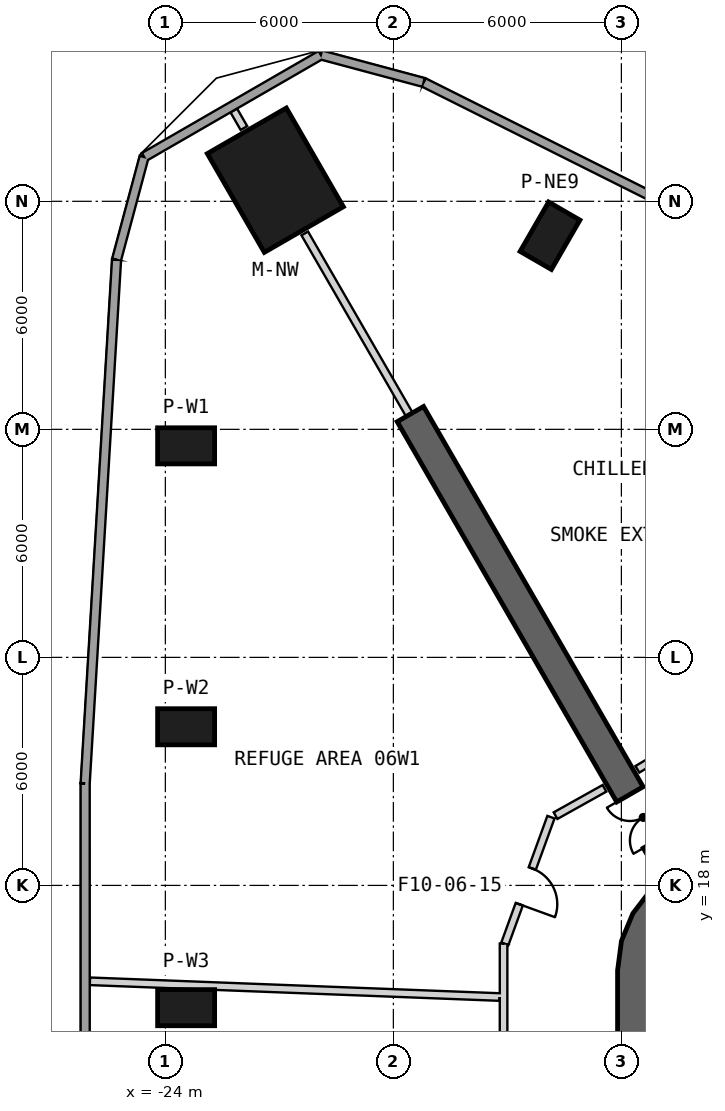
"""IFC4 building model, lengths in metres.
Left out: names, types, materials, properties, quantities, classifications, styles, units other than length and angle.
Written with IfcOpenShell. Run it as: python <this file> out.ifc"""

import sys

from ifc_helpers import new_model, si_unit, direction, frame, frame_2d, origin, origin_2d, place, context, subcontext, project, spatial, polyline, rectangle, outline, extrude, element, fill, save


model = new_model("IFC4")
c1 = context("Model", 3, precision=1e-05, world=origin(), true_north=direction((0.0, 1.0)))
c2 = subcontext(c1, "Body", "Model", "MODEL_VIEW")
j1 = project(units=[si_unit("LENGTHUNIT", "METRE"), si_unit("PLANEANGLEUNIT", "RADIAN")], contexts=[c1])
p1 = place(None, origin())
s1 = spatial("IfcSite", under=j1, at=p1, CompositionType="ELEMENT")
p2 = place(p1, origin())
s2 = spatial("IfcBuilding", under=s1, at=p2, CompositionType="ELEMENT")
p3 = place(p2, frame((0.0, 0.0, 39.5)))
s3 = spatial("IfcBuildingStorey", under=s2, at=p3, CompositionType="ELEMENT", Elevation=39.5)
p4 = place(p3, frame((-21.106, 36.556, 0.0), z_axis=(0.0, 0.0, 1.0), x_axis=(-0.5, 0.866025403784, 0.0)))
e1 = element("IfcColumn", 1, at=p4, inside=s3, PredefinedType="COLUMN", context=c2, shape_type="SweptSolid", body=[
    extrude(rectangle(XDim=3.0, YDim=2.4, at=origin_2d()), origin(), (0.0, 0.0, 1.0), 5.7),
])
for number, where, z_axis, x_axis in (
    (2, (-23.453, 29.566, 0.0), (0.0, 0.0, 1.0), (-1.0, 0.0, 0.0)),
    (3, (-23.453, 22.174, 0.0), (0.0, 0.0, 1.0), (-1.0, 0.0, 0.0)),
    (4, (-23.453, 14.783, 0.0), (0.0, 0.0, 1.0), (-1.0, 0.0, 0.0)),
    (5, (-13.878, 35.094, 0.0), (0.0, 0.0, 1.0), (0.5, 0.866, 0.0)),
):
    element("IfcColumn", number, at=place(p3, frame(where, z_axis=z_axis, x_axis=x_axis)), inside=s3, PredefinedType="COLUMN", context=c2, shape_type="SweptSolid", body=[
        extrude(rectangle(XDim=1.5, YDim=0.95, at=origin_2d()), origin(), (0.0, 0.0, 1.0), 5.7),
    ])
p5 = place(p3, frame((-11.65, 15.762, 0.0), z_axis=(0.0, 0.0, 1.0), x_axis=(0.0, -1.0, 0.0)))
e6 = element("IfcWall", 6, at=p5, inside=s3, PredefinedType="SHEAR", context=c2, shape_type="SweptSolid", body=[
    extrude(rectangle(XDim=31.523, YDim=0.9, at=frame_2d((15.762, 0.0))), origin(), (0.0, 0.0, 1.0), 6.0),
])
p6 = place(p5, frame((3.612, 0.0, 0.0)))
e7 = element("IfcOpeningElement", 7, at=p6, cuts=e6, PredefinedType="OPENING", context=c2, shape_type="SweptSolid", body=[
    extrude(rectangle(XDim=1.2, YDim=2.4, at=frame_2d((0.6, 1.2))), frame((0.0, 0.46, 0.0), z_axis=(0.0, -1.0, 0.0), x_axis=(1.0, 0.0, 0.0)), (0.0, 0.0, 1.0), 0.92),
])
p7 = place(p5, frame((26.712, 0.0, 0.0)))
e8 = element("IfcOpeningElement", 8, at=p7, cuts=e6, PredefinedType="OPENING", context=c2, shape_type="SweptSolid", body=[
    extrude(rectangle(XDim=1.2, YDim=2.4, at=frame_2d((0.6, 1.2))), frame((0.0, 0.46, 0.0), z_axis=(0.0, -1.0, 0.0), x_axis=(1.0, 0.0, 0.0)), (0.0, 0.0, 1.0), 0.92),
])
p8 = place(p3, origin())
e9 = element("IfcWall", 9, at=p8, inside=s3, PredefinedType="SHEAR", context=c2, shape_type="SweptSolid", body=[
    extrude(outline(polyline([(-7.6, 18.36), (-8.323, 18.659), (-9.1, 18.762), (-9.876, 18.659), (-10.6, 18.36), (-11.221, 17.883), (-11.698, 17.262), (-11.998, 16.538), (-12.1, 15.762), (-11.2, 15.762), (-11.128, 16.305), (-10.919, 16.812), (-10.585, 17.247), (-10.15, 17.58), (-9.644, 17.79), (-9.1, 17.862), (-8.556, 17.79), (-8.05, 17.58), (-7.6, 18.36)])), origin(), (0.0, 0.0, 1.0), 6.0),
])
p9 = place(p3, frame((-10.575, 18.316, 0.0), z_axis=(0.0, 0.0, 1.0), x_axis=(-0.499996575515, 0.866027380903, 0.0)))
e10 = element("IfcWall", 10, at=p9, inside=s3, PredefinedType="SHEAR", context=c2, shape_type="SweptSolid", body=[
    extrude(rectangle(XDim=13.954, YDim=0.8, at=frame_2d((6.977, 0.0))), origin(), (0.0, 0.0, 1.0), 6.0),
])
p10 = place(p9, frame((1.0, 0.0, 0.0)))
e11 = element("IfcOpeningElement", 11, at=p10, cuts=e10, PredefinedType="OPENING", context=c2, shape_type="SweptSolid", body=[
    extrude(rectangle(XDim=1.4, YDim=2.4, at=frame_2d((0.7, 1.2))), frame((0.0, 0.41, 0.0), z_axis=(0.0, -1.0, 0.0), x_axis=(1.0, 0.0, 0.0)), (0.0, 0.0, 1.0), 0.82),
])
p11 = place(p3, frame((-4.861, 32.952, 0.0), z_axis=(0.0, 0.0, 1.0), x_axis=(-0.894285628533, 0.447496608478, 0.0)))
e12 = element("IfcWall", 12, at=p11, inside=s3, PredefinedType="SOLIDWALL", context=c2, shape_type="SweptSolid", body=[
    extrude(rectangle(XDim=13.801, YDim=0.24, at=frame_2d((6.901, 0.0))), origin(), (0.0, 0.0, 1.0), 5.7),
])
p12 = place(p3, frame((-17.203, 39.128, 0.0), z_axis=(0.0, 0.0, 1.0), x_axis=(-0.965923146675, 0.25882904535, 0.0)))
e13 = element("IfcWall", 13, at=p12, inside=s3, PredefinedType="SOLIDWALL", context=c2, shape_type="SweptSolid", body=[
    extrude(rectangle(XDim=2.801, YDim=0.24, at=frame_2d((1.4, 0.0))), origin(), (0.0, 0.0, 1.0), 5.7),
])
p13 = place(p3, frame((-19.908, 39.853, 0.0), z_axis=(0.0, 0.0, 1.0), x_axis=(-0.866010734295, -0.500025407441, 0.0)))
e14 = element("IfcWall", 14, at=p13, inside=s3, PredefinedType="SOLIDWALL", context=c2, shape_type="SweptSolid", body=[
    extrude(rectangle(XDim=5.371, YDim=0.24, at=frame_2d((2.686, 0.0))), origin(), (0.0, 0.0, 1.0), 5.7),
])
p14 = place(p3, frame((-24.56, 37.167, 0.0), z_axis=(0.0, 0.0, 1.0), x_axis=(-0.258850842196, -0.965917305723, 0.0)))
e15 = element("IfcWall", 15, at=p14, inside=s3, PredefinedType="SOLIDWALL", context=c2, shape_type="SweptSolid", body=[
    extrude(rectangle(XDim=2.8, YDim=0.24, at=frame_2d((1.4, 0.0))), origin(), (0.0, 0.0, 1.0), 5.7),
])
p15 = place(p3, frame((-25.284, 34.462, 0.0), z_axis=(0.0, 0.0, 1.0), x_axis=(-0.059807686217, -0.998209918138, 0.0)))
e16 = element("IfcWall", 16, at=p15, inside=s3, PredefinedType="SOLIDWALL", context=c2, shape_type="SweptSolid", body=[
    extrude(rectangle(XDim=13.802, YDim=0.24, at=frame_2d((6.901, 0.0))), origin(), (0.0, 0.0, 1.0), 5.7),
])
p16 = place(p3, frame((-26.11, 20.685, 0.0), z_axis=(0.0, 0.0, 1.0), x_axis=(7.0815678e-05, -0.999999997493, 0.0)))
e17 = element("IfcWall", 17, at=p16, inside=s3, PredefinedType="SOLIDWALL", context=c2, shape_type="SweptSolid", body=[
    extrude(rectangle(XDim=41.371, YDim=0.24, at=frame_2d((20.685, 0.0))), origin(), (0.0, 0.0, 1.0), 5.7),
])
p17 = place(p3, frame((-15.1, 16.47, 0.0), z_axis=(0.0, 0.0, 1.0), x_axis=(0.0, -1.0, 0.0)))
e18 = element("IfcWall", 18, at=p17, inside=s3, PredefinedType="PARTITIONING", context=c2, shape_type="SweptSolid", body=[
    extrude(rectangle(XDim=32.94, YDim=0.2, at=frame_2d((16.47, 0.0))), origin(), (0.0, 0.0, 1.0), 4.88),
])
p18 = place(p17, frame((3.84, 0.0, 0.0)))
e19 = element("IfcOpeningElement", 19, at=p18, cuts=e18, PredefinedType="OPENING", context=c2, shape_type="SweptSolid", body=[
    extrude(rectangle(XDim=1.0, YDim=2.1, at=frame_2d((0.5, 1.05))), frame((0.0, 0.11, 0.0), z_axis=(0.0, -1.0, 0.0), x_axis=(1.0, 0.0, 0.0)), (0.0, 0.0, 1.0), 0.22),
])
p19 = place(p17, frame((9.805, 0.0, 0.0)))
e20 = element("IfcOpeningElement", 20, at=p19, cuts=e18, PredefinedType="OPENING", context=c2, shape_type="SweptSolid", body=[
    extrude(rectangle(XDim=1.0, YDim=2.1, at=frame_2d((0.5, 1.05))), frame((0.0, 0.11, 0.0), z_axis=(0.0, -1.0, 0.0), x_axis=(1.0, 0.0, 0.0)), (0.0, 0.0, 1.0), 0.22),
])
p20 = place(p17, frame((15.769, 0.0, 0.0)))
e21 = element("IfcOpeningElement", 21, at=p20, cuts=e18, PredefinedType="OPENING", context=c2, shape_type="SweptSolid", body=[
    extrude(rectangle(XDim=1.0, YDim=2.1, at=frame_2d((0.5, 1.05))), frame((0.0, 0.11, 0.0), z_axis=(0.0, -1.0, 0.0), x_axis=(1.0, 0.0, 0.0)), (0.0, 0.0, 1.0), 0.22),
])
p21 = place(p17, frame((21.734, 0.0, 0.0)))
e22 = element("IfcOpeningElement", 22, at=p21, cuts=e18, PredefinedType="OPENING", context=c2, shape_type="SweptSolid", body=[
    extrude(rectangle(XDim=1.0, YDim=2.1, at=frame_2d((0.5, 1.05))), frame((0.0, 0.11, 0.0), z_axis=(0.0, -1.0, 0.0), x_axis=(1.0, 0.0, 0.0)), (0.0, 0.0, 1.0), 0.22),
])
p22 = place(p17, frame((27.699, 0.0, 0.0)))
e23 = element("IfcOpeningElement", 23, at=p22, cuts=e18, PredefinedType="OPENING", context=c2, shape_type="SweptSolid", body=[
    extrude(rectangle(XDim=1.0, YDim=2.1, at=frame_2d((0.5, 1.05))), frame((0.0, 0.11, 0.0), z_axis=(0.0, -1.0, 0.0), x_axis=(1.0, 0.0, 0.0)), (0.0, 0.0, 1.0), 0.22),
])
p23 = place(p3, frame((-13.853, 19.796, 0.0), z_axis=(0.0, 0.0, 1.0), x_axis=(-0.342013954414, -0.939694873342, 0.0)))
e24 = element("IfcWall", 24, at=p23, inside=s3, PredefinedType="PARTITIONING", context=c2, shape_type="SweptSolid", body=[
    extrude(rectangle(XDim=3.546, YDim=0.2, at=frame_2d((1.773, 0.0))), origin(), (0.0, 0.0, 1.0), 4.78),
])
p24 = place(p23, frame((1.437, 0.0, 0.0)))
e25 = element("IfcOpeningElement", 25, at=p24, cuts=e24, PredefinedType="OPENING", context=c2, shape_type="SweptSolid", body=[
    extrude(rectangle(XDim=1.0, YDim=2.1, at=frame_2d((0.5, 1.05))), frame((0.0, 0.11, 0.0), z_axis=(0.0, -1.0, 0.0), x_axis=(1.0, 0.0, 0.0)), (0.0, 0.0, 1.0), 0.22),
])
p25 = place(p3, frame((-12.445, 20.555, 0.0), z_axis=(0.0, 0.0, 1.0), x_axis=(-0.873030545865, -0.487665526757, 0.0)))
e26 = element("IfcWall", 26, at=p25, inside=s3, PredefinedType="PARTITIONING", context=c2, shape_type="SweptSolid", body=[
    extrude(rectangle(XDim=1.475, YDim=0.2, at=frame_2d((0.737, 0.0))), origin(), (0.0, 0.0, 1.0), 5.7),
])
p26 = place(p3, frame((-25.984, 15.477, 0.0), z_axis=(0.0, 0.0, 1.0), x_axis=(0.999262877785, -0.038388814516, 0.0)))
e27 = element("IfcWall", 27, at=p26, inside=s3, PredefinedType="PARTITIONING", context=c2, shape_type="SweptSolid", body=[
    extrude(rectangle(XDim=10.792, YDim=0.2, at=frame_2d((5.396, 0.0))), origin(), (0.0, 0.0, 1.0), 4.88),
])
p27 = place(p3, frame((-17.578, 30.386, 0.0), z_axis=(0.0, 0.0, 1.0), x_axis=(-0.499982128061, 0.866035721907, 0.0)))
e28 = element("IfcWall", 28, at=p27, inside=s3, PredefinedType="PARTITIONING", context=c2, shape_type="SweptSolid", body=[
    extrude(rectangle(XDim=5.507, YDim=0.2, at=frame_2d((2.753, 0.0))), origin(), (0.0, 0.0, 1.0), 5.27),
])
p28 = place(p3, frame((-21.932, 37.927, 0.0), z_axis=(0.0, 0.0, 1.0), x_axis=(-0.499761856089, 0.866162852585, 0.0)))
e29 = element("IfcWall", 29, at=p28, inside=s3, PredefinedType="PARTITIONING", context=c2, shape_type="SweptSolid", body=[
    extrude(rectangle(XDim=0.536, YDim=0.2, at=frame_2d((0.268, 0.0))), origin(), (0.0, 0.0, 1.0), 5.7),
])
p29 = place(p3, frame((-10.148, 21.908, 0.0), z_axis=(0.0, 0.0, 1.0), x_axis=(-0.858835346978, -0.512251741608, 0.0)))
e30 = element("IfcWall", 30, at=p29, inside=s3, PredefinedType="PARTITIONING", context=c2, shape_type="SweptSolid", body=[
    extrude(rectangle(XDim=1.665, YDim=0.2, at=frame_2d((0.833, 0.0))), origin(), (0.0, 0.0, 1.0), 5.7),
])
p30 = place(p24, origin())
e31 = element("IfcDoor", 31, at=p30, inside=s3, OperationType="SINGLE_SWING_RIGHT", PredefinedType="USERDEFINED", context=c2, shape_type="SweptSolid", body=[
    extrude(rectangle(XDim=1.0, YDim=2.1, at=frame_2d((0.5, 1.05))), frame((0.0, 0.025, 0.0), z_axis=(0.0, -1.0, 0.0), x_axis=(1.0, 0.0, 0.0)), (0.0, 0.0, 1.0), 0.05),
])
fill(e25, e31)
p31 = place(p10, origin())
e32 = element("IfcDoor", 32, at=p31, inside=s3, OperationType="DOUBLE_DOOR_SINGLE_SWING", PredefinedType="NOTDEFINED", context=c2, shape_type="SweptSolid", body=[
    extrude(rectangle(XDim=1.4, YDim=2.4, at=frame_2d((0.7, 1.2))), frame((0.0, 0.025, 0.0), z_axis=(0.0, -1.0, 0.0), x_axis=(1.0, 0.0, 0.0)), (0.0, 0.0, 1.0), 0.05),
])
fill(e11, e32)
save(model, sys.argv[1])
